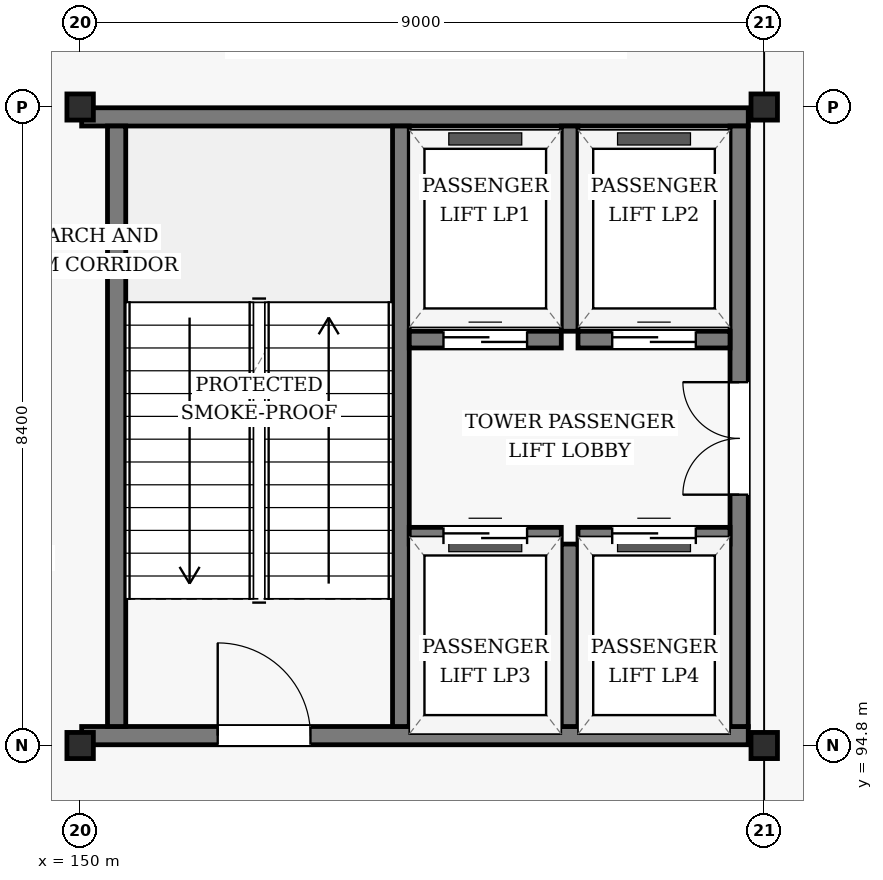
"""IFC4 building model, lengths in metres.
Left out: names, types, materials, properties, quantities, classifications, styles, units other than length and angle.
Written with IfcOpenShell. Run it as: python <this file> out.ifc"""

import sys

from ifc_helpers import new_model, si_unit, direction, frame, frame_2d, origin, origin_2d, place, context, subcontext, project, spatial, rectangle, i_section, extrude, element, fill, save


model = new_model("IFC4")
c1 = context("Model", 3, precision=1e-05, world=origin(), true_north=direction((0.0, 1.0)))
c2 = subcontext(c1, "Body", "Model", "MODEL_VIEW")
j1 = project(units=[si_unit("LENGTHUNIT", "METRE"), si_unit("PLANEANGLEUNIT", "RADIAN")], contexts=[c1])
p1 = place(None, origin())
s1 = spatial("IfcSite", under=j1, at=p1, CompositionType="ELEMENT")
p2 = place(p1, origin())
s2 = spatial("IfcBuilding", under=s1, at=p2, CompositionType="ELEMENT")
p3 = place(p2, frame((0.0, 0.0, 35.4)))
s3 = spatial("IfcBuildingStorey", under=s2, at=p3, CompositionType="ELEMENT", Elevation=35.4)
for number, where, z_axis, x_axis in (
    (1, (150.0, 94.8, 0.0), (0.0, 0.0, 1.0), (1.0, 0.0, 0.0)),
    (2, (150.0, 103.2, 0.0), (0.0, 0.0, 1.0), (1.0, 0.0, 0.0)),
    (3, (159.0, 94.8, 0.0), (0.0, 0.0, 1.0), (1.0, 0.0, 0.0)),
    (4, (159.0, 103.2, 0.0), (0.0, 0.0, 1.0), (1.0, 0.0, 0.0)),
):
    element("IfcColumn", number, at=place(p3, frame(where, z_axis=z_axis, x_axis=x_axis)), inside=s3, PredefinedType="COLUMN", context=c2, shape_type="SweptSolid", body=[
        extrude(i_section(OverallWidth=0.348, OverallDepth=0.344, WebThickness=0.01, FlangeThickness=0.016, FilletRadius=0.02, at=origin_2d()), origin(), (0.0, 0.0, 1.0), 4.2),
    ])
p4 = place(p3, frame((150.02, 94.93, 0.0), z_axis=(0.0, 0.0, 1.0), x_axis=(1.0, 0.0, 0.0)))
e5 = element("IfcWall", 5, at=p4, inside=s3, PredefinedType="SHEAR", context=c2, shape_type="SweptSolid", body=[
    extrude(rectangle(XDim=8.77, YDim=0.24, at=frame_2d((4.385, 0.0))), origin(), (0.0, 0.0, 1.0), 3.948),
])
p5 = place(p4, frame((1.79, 0.0, 0.0)))
e6 = element("IfcOpeningElement", 6, at=p5, cuts=e5, PredefinedType="OPENING", context=c2, shape_type="SweptSolid", body=[
    extrude(rectangle(XDim=1.22, YDim=2.18, at=frame_2d((0.61, 1.09))), frame((0.0, 0.13, 0.0), z_axis=(0.0, -1.0, 0.0), x_axis=(1.0, 0.0, 0.0)), (0.0, 0.0, 1.0), 0.26),
])
p6 = place(p3, frame((150.02, 103.07, 0.0), z_axis=(0.0, 0.0, 1.0), x_axis=(1.0, 0.0, 0.0)))
e7 = element("IfcWall", 7, at=p6, inside=s3, PredefinedType="SHEAR", context=c2, shape_type="SweptSolid", body=[
    extrude(rectangle(XDim=8.77, YDim=0.24, at=frame_2d((4.385, 0.0))), origin(), (0.0, 0.0, 1.0), 3.948),
])
p7 = place(p3, frame((150.48, 95.05, 0.0), z_axis=(0.0, 0.0, 1.0), x_axis=(0.0, 1.0, 0.0)))
e8 = element("IfcWall", 8, at=p7, inside=s3, PredefinedType="SHEAR", context=c2, shape_type="SweptSolid", body=[
    extrude(rectangle(XDim=7.9, YDim=0.24, at=frame_2d((3.95, 0.0))), origin(), (0.0, 0.0, 1.0), 3.948),
])
p8 = place(p3, frame((154.22, 95.05, 0.0), z_axis=(0.0, 0.0, 1.0), x_axis=(0.0, 1.0, 0.0)))
e9 = element("IfcWall", 9, at=p8, inside=s3, PredefinedType="SHEAR", context=c2, shape_type="SweptSolid", body=[
    extrude(rectangle(XDim=7.9, YDim=0.22, at=frame_2d((3.95, 0.0))), origin(), (0.0, 0.0, 1.0), 3.948),
])
p9 = place(p3, frame((158.67, 95.05, 0.0), z_axis=(0.0, 0.0, 1.0), x_axis=(0.0, 1.0, 0.0)))
e10 = element("IfcWall", 10, at=p9, inside=s3, PredefinedType="SHEAR", context=c2, shape_type="SweptSolid", body=[
    extrude(rectangle(XDim=7.9, YDim=0.24, at=frame_2d((3.95, 0.0))), origin(), (0.0, 0.0, 1.0), 3.948),
])
p10 = place(p9, frame((3.05, 0.0, 0.0)))
e11 = element("IfcOpeningElement", 11, at=p10, cuts=e10, PredefinedType="OPENING", context=c2, shape_type="SweptSolid", body=[
    extrude(rectangle(XDim=1.48, YDim=2.22, at=frame_2d((0.74, 1.11))), frame((0.0, 0.13, 0.0), z_axis=(0.0, -1.0, 0.0), x_axis=(1.0, 0.0, 0.0)), (0.0, 0.0, 1.0), 0.26),
])
p11 = place(p3, frame((156.44, 100.25, 0.0), z_axis=(0.0, 0.0, 1.0), x_axis=(0.0, 1.0, 0.0)))
e12 = element("IfcWall", 12, at=p11, inside=s3, PredefinedType="SHEAR", context=c2, shape_type="SweptSolid", body=[
    extrude(rectangle(XDim=2.7, YDim=0.22, at=frame_2d((1.35, 0.0))), origin(), (0.0, 0.0, 1.0), 3.948),
])
p12 = place(p3, frame((154.33, 100.14, 0.0), z_axis=(0.0, 0.0, 1.0), x_axis=(1.0, 0.0, 0.0)))
e13 = element("IfcWall", 13, at=p12, inside=s3, PredefinedType="SHEAR", context=c2, shape_type="SweptSolid", body=[
    extrude(rectangle(XDim=2.0, YDim=0.22, at=frame_2d((1.0, 0.0))), origin(), (0.0, 0.0, 1.0), 3.948),
])
p13 = place(p12, frame((0.45, 0.0, 0.0)))
e14 = element("IfcOpeningElement", 14, at=p13, cuts=e13, PredefinedType="OPENING", context=c2, shape_type="SweptSolid", body=[
    extrude(rectangle(XDim=1.1, YDim=2.15, at=frame_2d((0.55, 1.075))), frame((0.0, 0.12, 0.0), z_axis=(0.0, -1.0, 0.0), x_axis=(1.0, 0.0, 0.0)), (0.0, 0.0, 1.0), 0.24),
])
p14 = place(p3, frame((156.55, 100.14, 0.0), z_axis=(0.0, 0.0, 1.0), x_axis=(1.0, 0.0, 0.0)))
e15 = element("IfcWall", 15, at=p14, inside=s3, PredefinedType="SHEAR", context=c2, shape_type="SweptSolid", body=[
    extrude(rectangle(XDim=2.0, YDim=0.22, at=frame_2d((1.0, 0.0))), origin(), (0.0, 0.0, 1.0), 3.948),
])
p15 = place(p14, frame((0.45, 0.0, 0.0)))
e16 = element("IfcOpeningElement", 16, at=p15, cuts=e15, PredefinedType="OPENING", context=c2, shape_type="SweptSolid", body=[
    extrude(rectangle(XDim=1.1, YDim=2.15, at=frame_2d((0.55, 1.075))), frame((0.0, 0.12, 0.0), z_axis=(0.0, -1.0, 0.0), x_axis=(1.0, 0.0, 0.0)), (0.0, 0.0, 1.0), 0.24),
])
p16 = place(p3, frame((156.44, 95.05, 0.0), z_axis=(0.0, 0.0, 1.0), x_axis=(0.0, 1.0, 0.0)))
e17 = element("IfcWall", 17, at=p16, inside=s3, PredefinedType="SHEAR", context=c2, shape_type="SweptSolid", body=[
    extrude(rectangle(XDim=2.4, YDim=0.22, at=frame_2d((1.2, 0.0))), origin(), (0.0, 0.0, 1.0), 3.948),
])
p17 = place(p3, frame((154.33, 97.56, 0.0), z_axis=(0.0, 0.0, 1.0), x_axis=(1.0, 0.0, 0.0)))
e18 = element("IfcWall", 18, at=p17, inside=s3, PredefinedType="SHEAR", context=c2, shape_type="SweptSolid", body=[
    extrude(rectangle(XDim=2.0, YDim=0.22, at=frame_2d((1.0, 0.0))), origin(), (0.0, 0.0, 1.0), 3.948),
])
p18 = place(p17, frame((0.45, 0.0, 0.0)))
e19 = element("IfcOpeningElement", 19, at=p18, cuts=e18, PredefinedType="OPENING", context=c2, shape_type="SweptSolid", body=[
    extrude(rectangle(XDim=1.1, YDim=2.15, at=frame_2d((0.55, 1.075))), frame((0.0, 0.12, 0.0), z_axis=(0.0, -1.0, 0.0), x_axis=(1.0, 0.0, 0.0)), (0.0, 0.0, 1.0), 0.24),
])
p19 = place(p3, frame((156.55, 97.56, 0.0), z_axis=(0.0, 0.0, 1.0), x_axis=(1.0, 0.0, 0.0)))
e20 = element("IfcWall", 20, at=p19, inside=s3, PredefinedType="SHEAR", context=c2, shape_type="SweptSolid", body=[
    extrude(rectangle(XDim=2.0, YDim=0.22, at=frame_2d((1.0, 0.0))), origin(), (0.0, 0.0, 1.0), 3.948),
])
p20 = place(p19, frame((0.45, 0.0, 0.0)))
e21 = element("IfcOpeningElement", 21, at=p20, cuts=e20, PredefinedType="OPENING", context=c2, shape_type="SweptSolid", body=[
    extrude(rectangle(XDim=1.1, YDim=2.15, at=frame_2d((0.55, 1.075))), frame((0.0, 0.12, 0.0), z_axis=(0.0, -1.0, 0.0), x_axis=(1.0, 0.0, 0.0)), (0.0, 0.0, 1.0), 0.24),
])
p21 = place(p5, origin())
e22 = element("IfcDoor", 22, at=p21, inside=s3, OperationType="SINGLE_SWING_LEFT", PredefinedType="DOOR", context=c2, shape_type="SweptSolid", body=[
    extrude(rectangle(XDim=1.22, YDim=2.18, at=frame_2d((0.61, 1.09))), frame((0.0, 0.025, 0.0), z_axis=(0.0, -1.0, 0.0), x_axis=(1.0, 0.0, 0.0)), (0.0, 0.0, 1.0), 0.05),
])
fill(e6, e22)
p22 = place(p10, origin())
e23 = element("IfcDoor", 23, at=p22, inside=s3, OperationType="DOUBLE_DOOR_SINGLE_SWING", PredefinedType="DOOR", context=c2, shape_type="SweptSolid", body=[
    extrude(rectangle(XDim=1.48, YDim=2.22, at=frame_2d((0.74, 1.11))), frame((0.0, 0.025, 0.0), z_axis=(0.0, -1.0, 0.0), x_axis=(1.0, 0.0, 0.0)), (0.0, 0.0, 1.0), 0.05),
])
fill(e11, e23)
p23 = place(p13, origin())
e24 = element("IfcDoor", 24, at=p23, inside=s3, OperationType="SLIDING_TO_LEFT", PredefinedType="DOOR", context=c2, shape_type="SweptSolid", body=[
    extrude(rectangle(XDim=1.1, YDim=2.15, at=frame_2d((0.55, 1.075))), frame((0.0, 0.025, 0.0), z_axis=(0.0, -1.0, 0.0), x_axis=(1.0, 0.0, 0.0)), (0.0, 0.0, 1.0), 0.05),
])
fill(e14, e24)
p24 = place(p15, origin())
e25 = element("IfcDoor", 25, at=p24, inside=s3, OperationType="SLIDING_TO_LEFT", PredefinedType="DOOR", context=c2, shape_type="SweptSolid", body=[
    extrude(rectangle(XDim=1.1, YDim=2.15, at=frame_2d((0.55, 1.075))), frame((0.0, 0.025, 0.0), z_axis=(0.0, -1.0, 0.0), x_axis=(1.0, 0.0, 0.0)), (0.0, 0.0, 1.0), 0.05),
])
fill(e16, e25)
p25 = place(p18, origin())
e26 = element("IfcDoor", 26, at=p25, inside=s3, OperationType="SLIDING_TO_LEFT", PredefinedType="DOOR", context=c2, shape_type="SweptSolid", body=[
    extrude(rectangle(XDim=1.1, YDim=2.15, at=frame_2d((0.55, 1.075))), frame((0.0, 0.025, 0.0), z_axis=(0.0, -1.0, 0.0), x_axis=(1.0, 0.0, 0.0)), (0.0, 0.0, 1.0), 0.05),
])
fill(e19, e26)
p26 = place(p20, origin())
e27 = element("IfcDoor", 27, at=p26, inside=s3, OperationType="SLIDING_TO_LEFT", PredefinedType="DOOR", context=c2, shape_type="SweptSolid", body=[
    extrude(rectangle(XDim=1.1, YDim=2.15, at=frame_2d((0.55, 1.075))), frame((0.0, 0.025, 0.0), z_axis=(0.0, -1.0, 0.0), x_axis=(1.0, 0.0, 0.0)), (0.0, 0.0, 1.0), 0.05),
])
fill(e21, e27)
save(model, sys.argv[1])
